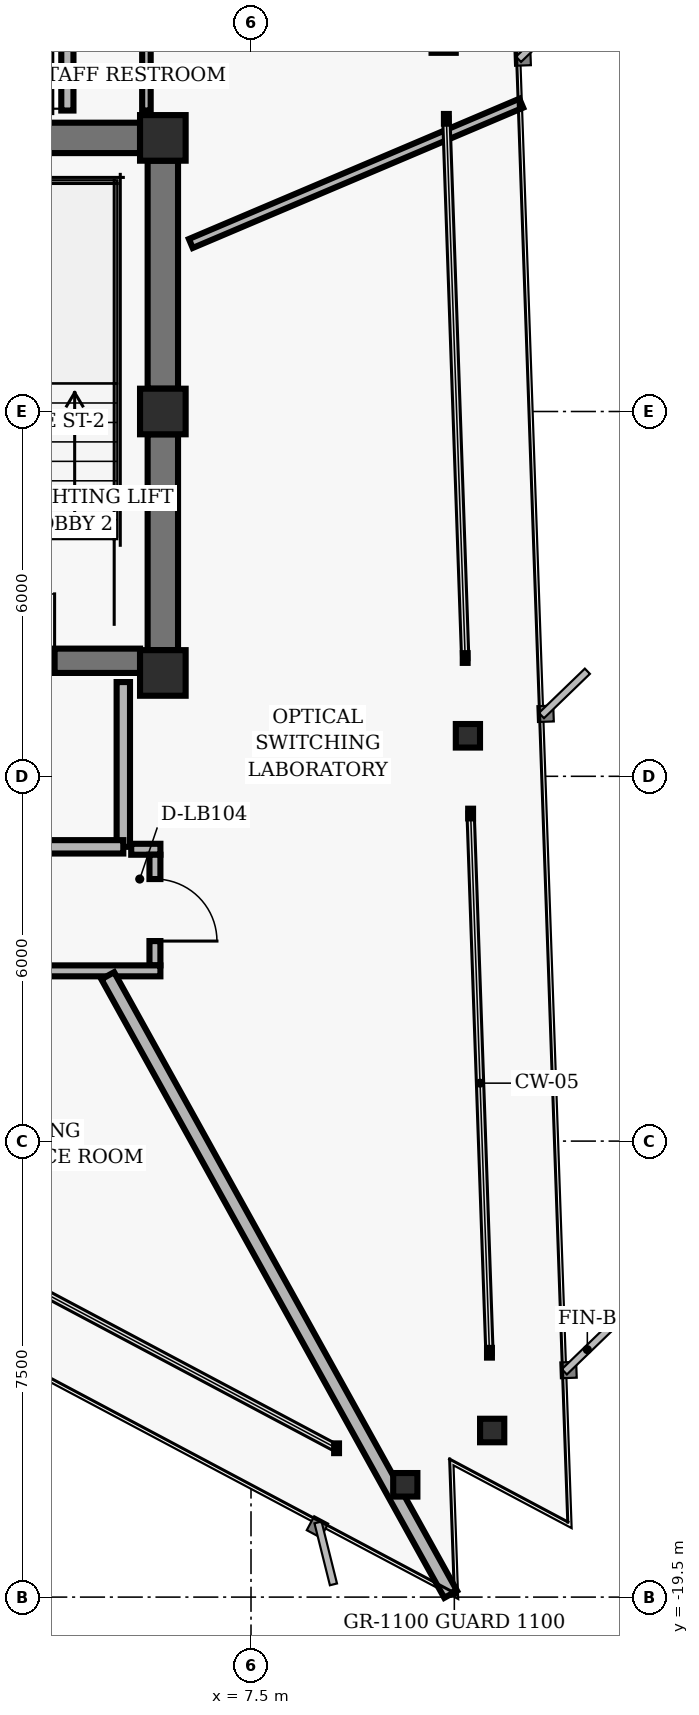
"""IFC4 building model, lengths in metres.
Left out: names, types, materials, properties, quantities, classifications, styles, units other than length and angle.
Written with IfcOpenShell. Run it as: python <this file> out.ifc"""

import sys

from ifc_helpers import new_model, si_unit, direction, frame, frame_2d, origin, origin_2d, place, context, subcontext, project, spatial, rectangle, hollow_rectangle, i_section, extrude, element, fill, save


model = new_model("IFC4")
c1 = context("Model", 3, precision=1e-05, world=origin(), true_north=direction((0.0, 1.0)))
c2 = subcontext(c1, "Body", "Model", "MODEL_VIEW")
j1 = project(units=[si_unit("LENGTHUNIT", "METRE"), si_unit("PLANEANGLEUNIT", "RADIAN")], contexts=[c1])
p1 = place(None, origin())
s1 = spatial("IfcSite", under=j1, at=p1, CompositionType="ELEMENT")
p2 = place(p1, origin())
s2 = spatial("IfcBuilding", under=s1, at=p2, CompositionType="ELEMENT")
p3 = place(p2, frame((0.0, 0.0, 196.64)))
s3 = spatial("IfcBuildingStorey", under=s2, at=p3, CompositionType="ELEMENT", Elevation=196.64)
for number, where, z_axis, x_axis in (
    (1, (6.05, 4.5, 0.0), (0.0, 0.0, 1.0), (1.0, 0.0, 0.0)),
    (2, (6.05, 0.0, 0.0), (0.0, 0.0, 1.0), (1.0, 0.0, 0.0)),
    (3, (6.05, -4.3, 0.0), (0.0, 0.0, 1.0), (1.0, 0.0, 0.0)),
):
    element("IfcColumn", number, at=place(p3, frame(where, z_axis=z_axis, x_axis=x_axis)), inside=s3, PredefinedType="COLUMN", context=c2, shape_type="SweptSolid", body=[
        extrude(hollow_rectangle(XDim=0.75, YDim=0.75, WallThickness=0.05, InnerFilletRadius=0.02, OuterFilletRadius=0.04, at=origin_2d()), origin(), (0.0, 0.0, 1.0), 3.04),
    ])
p4 = place(p3, frame((6.05, 0.375, 0.0), z_axis=(0.0, 0.0, 1.0), x_axis=(0.0, 1.0, 0.0)))
e4 = element("IfcWall", 4, at=p4, inside=s3, PredefinedType="SHEAR", context=c2, shape_type="SweptSolid", body=[
    extrude(rectangle(XDim=3.75, YDim=0.5, at=frame_2d((1.875, 0.0))), origin(), (0.0, 0.0, 1.0), 2.798),
])
p5 = place(p3, frame((6.05, -3.925, 0.0), z_axis=(0.0, 0.0, 1.0), x_axis=(0.0, 1.0, 0.0)))
e5 = element("IfcWall", 5, at=p5, inside=s3, PredefinedType="SHEAR", context=c2, shape_type="SweptSolid", body=[
    extrude(rectangle(XDim=3.55, YDim=0.5, at=frame_2d((1.775, 0.0))), origin(), (0.0, 0.0, 1.0), 2.798),
])
p6 = place(p3, frame((-5.675, -4.1, 0.0), z_axis=(0.0, 0.0, 1.0), x_axis=(1.0, 0.0, 0.0)))
e6 = element("IfcWall", 6, at=p6, inside=s3, PredefinedType="SHEAR", context=c2, shape_type="SweptSolid", body=[
    extrude(rectangle(XDim=11.35, YDim=0.4, at=frame_2d((5.675, 0.0))), origin(), (0.0, 0.0, 1.0), 2.798),
])
p7 = place(p6, frame((1.405, 0.0, 0.0)))
e7 = element("IfcOpeningElement", 7, at=p7, cuts=e6, PredefinedType="OPENING", context=c2, shape_type="SweptSolid", body=[
    extrude(rectangle(XDim=1.1, YDim=2.04, at=frame_2d((0.55, 1.02))), frame((0.0, 0.21, 0.0), z_axis=(0.0, -1.0, 0.0), x_axis=(1.0, 0.0, 0.0)), (0.0, 0.0, 1.0), 0.42),
])
p8 = place(p6, frame((8.845, 0.0, 0.0)))
e8 = element("IfcOpeningElement", 8, at=p8, cuts=e6, PredefinedType="OPENING", context=c2, shape_type="SweptSolid", body=[
    extrude(rectangle(XDim=1.1, YDim=2.04, at=frame_2d((0.55, 1.02))), frame((0.0, 0.21, 0.0), z_axis=(0.0, -1.0, 0.0), x_axis=(1.0, 0.0, 0.0)), (0.0, 0.0, 1.0), 0.42),
])
p9 = place(p6, frame((4.145, 0.0, 0.0)))
e9 = element("IfcOpeningElement", 9, at=p9, cuts=e6, PredefinedType="OPENING", context=c2, shape_type="SweptSolid", body=[
    extrude(rectangle(XDim=1.06, YDim=2.04, at=frame_2d((0.53, 1.02))), frame((0.0, 0.21, 0.0), z_axis=(0.0, -1.0, 0.0), x_axis=(1.0, 0.0, 0.0)), (0.0, 0.0, 1.0), 0.42),
])
p10 = place(p6, frame((6.145, 0.0, 0.0)))
e10 = element("IfcOpeningElement", 10, at=p10, cuts=e6, PredefinedType="OPENING", context=c2, shape_type="SweptSolid", body=[
    extrude(rectangle(XDim=1.06, YDim=2.04, at=frame_2d((0.53, 1.02))), frame((0.0, 0.21, 0.0), z_axis=(0.0, -1.0, 0.0), x_axis=(1.0, 0.0, 0.0)), (0.0, 0.0, 1.0), 0.42),
])
p11 = place(p3, frame((2.05, 4.5, 0.0), z_axis=(0.0, 0.0, 1.0), x_axis=(1.0, 0.0, 0.0)))
e11 = element("IfcWall", 11, at=p11, inside=s3, PredefinedType="SHEAR", context=c2, shape_type="SweptSolid", body=[
    extrude(rectangle(XDim=3.625, YDim=0.5, at=frame_2d((1.812, 0.0))), origin(), (0.0, 0.0, 1.0), 2.798),
])
for number, where, z_axis, x_axis in (
    (12, (11.466, -16.76, 0.0), (0.0, 0.0, 1.0), (1.0, 0.0, 0.0)),
    (13, (11.067, -5.334, 0.0), (0.0, 0.0, 1.0), (1.0, 0.0, 0.0)),
    (14, (10.668, 6.093, 0.0), (0.0, 0.0, 1.0), (1.0, 0.0, 0.0)),
    (15, (10.037, -17.653, 0.0), (0.0, 0.0, 1.0), (1.0, 0.0, 0.0)),
):
    element("IfcColumn", number, at=place(p3, frame(where, z_axis=z_axis, x_axis=x_axis)), inside=s3, PredefinedType="COLUMN", context=c2, shape_type="SweptSolid", body=[
        extrude(i_section(OverallWidth=0.398, OverallDepth=0.387, WebThickness=0.021, FlangeThickness=0.033, FilletRadius=0.018, at=origin_2d()), origin(), (0.0, 0.0, 1.0), 3.04),
    ])
p12 = place(p3, frame((5.4, -7.16, 0.0), z_axis=(0.0, 0.0, 1.0), x_axis=(0.0, 1.0, 0.0)))
e16 = element("IfcWall", 16, at=p12, inside=s3, PredefinedType="PARTITIONING", context=c2, shape_type="SweptSolid", body=[
    extrude(rectangle(XDim=2.71, YDim=0.22, at=frame_2d((1.355, 0.0))), origin(), (0.0, 0.0, 1.0), 2.773),
])
p13 = place(p3, frame((0.0, -7.16, 0.0), z_axis=(0.0, 0.0, 1.0), x_axis=(1.0, 0.0, 0.0)))
e17 = element("IfcWall", 17, at=p13, inside=s3, PredefinedType="PARTITIONING", context=c2, shape_type="SweptSolid", body=[
    extrude(rectangle(XDim=5.4, YDim=0.22, at=frame_2d((2.7, 0.0))), origin(), (0.0, 0.0, 1.0), 2.773),
])
p14 = place(p13, frame((2.05, 0.0, 0.0)))
e18 = element("IfcOpeningElement", 18, at=p14, cuts=e17, PredefinedType="OPENING", context=c2, shape_type="SweptSolid", body=[
    extrude(rectangle(XDim=1.12, YDim=2.02, at=frame_2d((0.56, 1.01))), frame((0.0, 0.12, 0.0), z_axis=(0.0, -1.0, 0.0), x_axis=(1.0, 0.0, 0.0)), (0.0, 0.0, 1.0), 0.24),
])
p15 = place(p3, frame((4.48, 4.95, 0.0), z_axis=(0.0, 0.0, 1.0), x_axis=(0.0, 1.0, 0.0)))
e19 = element("IfcWall", 19, at=p15, inside=s3, PredefinedType="PARTITIONING", context=c2, shape_type="SweptSolid", body=[
    extrude(rectangle(XDim=2.1, YDim=0.2, at=frame_2d((1.05, 0.0))), origin(), (0.0, 0.0, 1.0), 2.773),
])
p16 = place(p3, frame((5.78, 4.95, 0.0), z_axis=(0.0, 0.0, 1.0), x_axis=(0.0, 1.0, 0.0)))
e20 = element("IfcWall", 20, at=p16, inside=s3, PredefinedType="PARTITIONING", context=c2, shape_type="SweptSolid", body=[
    extrude(rectangle(XDim=2.1, YDim=0.14, at=frame_2d((1.05, 0.0))), origin(), (0.0, 0.0, 1.0), 2.253),
])
p17 = place(p3, frame((5.53, -7.2, 0.0), z_axis=(0.0, 0.0, 1.0), x_axis=(1.0, 0.0, 0.0)))
e21 = element("IfcWall", 21, at=p17, inside=s3, PredefinedType="PARTITIONING", context=c2, shape_type="SweptSolid", body=[
    extrude(rectangle(XDim=0.48, YDim=0.18, at=frame_2d((0.24, 0.0))), origin(), (0.0, 0.0, 1.0), 2.773),
])
p18 = place(p3, frame((5.92, -7.29, 0.0), z_axis=(0.0, 0.0, 1.0), x_axis=(0.0, -1.0, 0.0)))
e22 = element("IfcWall", 22, at=p18, inside=s3, PredefinedType="PARTITIONING", context=c2, shape_type="SweptSolid", body=[
    extrude(rectangle(XDim=1.82, YDim=0.18, at=frame_2d((0.91, 0.0))), origin(), (0.0, 0.0, 1.0), 2.773),
])
p19 = place(p18, frame((0.4, 0.0, 0.0)))
e23 = element("IfcOpeningElement", 23, at=p19, cuts=e22, PredefinedType="OPENING", context=c2, shape_type="SweptSolid", body=[
    extrude(rectangle(XDim=1.02, YDim=2.02, at=frame_2d((0.51, 1.01))), frame((0.0, 0.1, 0.0), z_axis=(0.0, -1.0, 0.0), x_axis=(1.0, 0.0, 0.0)), (0.0, 0.0, 1.0), 0.2),
])
p20 = place(p3, frame((6.01, -9.2, 0.0), z_axis=(0.0, 0.0, 1.0), x_axis=(-1.0, 0.0, 0.0)))
e24 = element("IfcWall", 24, at=p20, inside=s3, PredefinedType="PARTITIONING", context=c2, shape_type="SweptSolid", body=[
    extrude(rectangle(XDim=13.3, YDim=0.18, at=frame_2d((6.65, 0.0))), origin(), (0.0, 0.0, 1.0), 2.395),
])
p21 = place(p20, frame((9.948, 0.0, 0.0)))
e25 = element("IfcOpeningElement", 25, at=p21, cuts=e24, PredefinedType="OPENING", context=c2, shape_type="SweptSolid", body=[
    extrude(rectangle(XDim=0.96, YDim=2.02, at=frame_2d((0.48, 1.01))), frame((0.0, 0.1, 0.0), z_axis=(0.0, -1.0, 0.0), x_axis=(1.0, 0.0, 0.0)), (0.0, 0.0, 1.0), 0.2),
])
p22 = place(p20, frame((3.857, 0.0, 0.0)))
e26 = element("IfcOpeningElement", 26, at=p22, cuts=e24, PredefinedType="OPENING", context=c2, shape_type="SweptSolid", body=[
    extrude(rectangle(XDim=0.96, YDim=2.02, at=frame_2d((0.48, 1.01))), frame((0.0, 0.1, 0.0), z_axis=(0.0, -1.0, 0.0), x_axis=(1.0, 0.0, 0.0)), (0.0, 0.0, 1.0), 0.2),
])
p23 = place(p3, frame((5.144, -9.28, 0.0), z_axis=(0.0, 0.0, 1.0), x_axis=(0.484798043034, -0.874626124393, 0.0)))
e27 = element("IfcWall", 27, at=p23, inside=s3, PredefinedType="PARTITIONING", context=c2, shape_type="SweptSolid", body=[
    extrude(rectangle(XDim=11.633, YDim=0.24, at=frame_2d((5.816, 0.0))), origin(), (0.0, 0.0, 1.0), 2.253),
])
p24 = place(p3, frame((6.51, 2.763, 0.0), z_axis=(0.0, 0.0, 1.0), x_axis=(0.920487144923, 0.390772844543, 0.0)))
e28 = element("IfcWall", 28, at=p24, inside=s3, PredefinedType="PARTITIONING", context=c2, shape_type="SweptSolid", body=[
    extrude(rectangle(XDim=5.904, YDim=0.16, at=frame_2d((2.952, 0.0))), origin(), (0.0, 0.0, 1.0), 2.773),
])
p25 = place(p8, origin())
e29 = element("IfcDoor", 29, at=p25, inside=s3, OperationType="SINGLE_SWING_RIGHT", PredefinedType="DOOR", context=c2, shape_type="SweptSolid", body=[
    extrude(rectangle(XDim=1.1, YDim=2.04, at=frame_2d((0.55, 1.02))), frame((0.0, 0.025, 0.0), z_axis=(0.0, -1.0, 0.0), x_axis=(1.0, 0.0, 0.0)), (0.0, 0.0, 1.0), 0.05),
])
fill(e8, e29)
p26 = place(p19, origin())
e30 = element("IfcDoor", 30, at=p26, inside=s3, OperationType="SINGLE_SWING_RIGHT", PredefinedType="DOOR", context=c2, shape_type="SweptSolid", body=[
    extrude(rectangle(XDim=1.02, YDim=2.02, at=frame_2d((0.51, 1.01))), frame((0.0, 0.025, 0.0), z_axis=(0.0, -1.0, 0.0), x_axis=(1.0, 0.0, 0.0)), (0.0, 0.0, 1.0), 0.05),
])
fill(e23, e30)
save(model, sys.argv[1])
